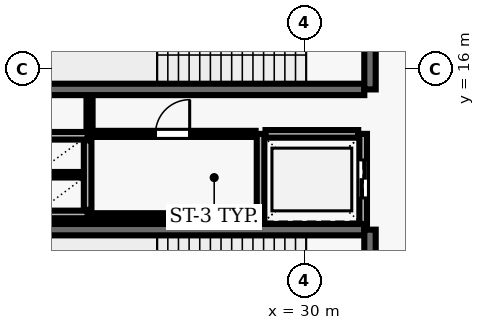
"""IFC4 building model, lengths in metres.
Left out: names, types, materials, properties, quantities, classifications, styles, units other than length and angle.
Written with IfcOpenShell. Run it as: python <this file> out.ifc"""

import sys

from ifc_helpers import new_model, si_unit, direction, frame, frame_2d, origin, place, context, subcontext, project, spatial, rectangle, extrude, element, fill, save


model = new_model("IFC4")
c1 = context("Model", 3, precision=1e-05, world=origin(), true_north=direction((0.0, 1.0)))
c2 = subcontext(c1, "Body", "Model", "MODEL_VIEW")
j1 = project(units=[si_unit("LENGTHUNIT", "METRE"), si_unit("PLANEANGLEUNIT", "RADIAN")], contexts=[c1])
p1 = place(None, origin())
s1 = spatial("IfcSite", under=j1, at=p1, CompositionType="ELEMENT")
p2 = place(p1, origin())
s2 = spatial("IfcBuilding", under=s1, at=p2, CompositionType="ELEMENT")
p3 = place(p2, frame((0.0, 0.0, 98.4)))
s3 = spatial("IfcBuildingStorey", under=s2, at=p3, CompositionType="ELEMENT", Elevation=98.4)
p4 = place(p3, frame((23.22, 15.47, 0.0), z_axis=(0.0, 0.0, 1.0), x_axis=(1.0, 0.0, 0.0)))
e1 = element("IfcWall", 1, at=p4, inside=s3, PredefinedType="SHEAR", context=c2, shape_type="SweptSolid", body=[
    extrude(rectangle(XDim=8.36, YDim=0.3, at=frame_2d((4.18, 0.0))), origin(), (0.0, 0.0, 1.0), 4.79),
])
p5 = place(p3, frame((31.73, 15.47, 0.0), z_axis=(0.0, 0.0, 1.0), x_axis=(0.0, 1.0, 0.0)))
e2 = element("IfcWall", 2, at=p5, inside=s3, PredefinedType="SHEAR", context=c2, shape_type="SweptSolid", body=[
    extrude(rectangle(XDim=3.51, YDim=0.3, at=frame_2d((1.755, 0.0))), origin(), (0.0, 0.0, 1.0), 4.79),
])
p6 = place(p5, frame((1.18, 0.0, 0.0)))
e3 = element("IfcOpeningElement", 3, at=p6, cuts=e2, PredefinedType="OPENING", context=c2, shape_type="SweptSolid", body=[
    extrude(rectangle(XDim=1.15, YDim=2.15, at=frame_2d((0.575, 1.075))), frame((0.0, 0.16, 0.0), z_axis=(0.0, -1.0, 0.0), x_axis=(1.0, 0.0, 0.0)), (0.0, 0.0, 1.0), 0.32),
])
p7 = place(p3, frame((31.58, 11.78, 0.0), z_axis=(0.0, 0.0, 1.0), x_axis=(-1.0, 0.0, 0.0)))
e4 = element("IfcWall", 4, at=p7, inside=s3, PredefinedType="SHEAR", context=c2, shape_type="SweptSolid", body=[
    extrude(rectangle(XDim=8.36, YDim=0.3, at=frame_2d((4.18, 0.0))), origin(), (0.0, 0.0, 1.0), 4.79),
])
p8 = place(p3, frame((31.73, 8.27, 0.0), z_axis=(0.0, 0.0, 1.0), x_axis=(0.0, 1.0, 0.0)))
e5 = element("IfcWall", 5, at=p8, inside=s3, PredefinedType="SHEAR", context=c2, shape_type="SweptSolid", body=[
    extrude(rectangle(XDim=3.51, YDim=0.3, at=frame_2d((1.755, 0.0))), origin(), (0.0, 0.0, 1.0), 4.79),
])
p9 = place(p8, frame((1.18, 0.0, 0.0)))
e6 = element("IfcOpeningElement", 6, at=p9, cuts=e5, PredefinedType="OPENING", context=c2, shape_type="SweptSolid", body=[
    extrude(rectangle(XDim=1.15, YDim=2.15, at=frame_2d((0.575, 1.075))), frame((0.0, 0.16, 0.0), z_axis=(0.0, -1.0, 0.0), x_axis=(1.0, 0.0, 0.0)), (0.0, 0.0, 1.0), 0.32),
])
p10 = place(p3, frame((28.85, 14.3, 0.0), z_axis=(0.0, 0.0, 1.0), x_axis=(0.0, -1.0, 0.0)))
e7 = element("IfcWall", 7, at=p10, inside=s3, PredefinedType="SOLIDWALL", context=c2, shape_type="SweptSolid", body=[
    extrude(rectangle(XDim=2.37, YDim=0.2, at=frame_2d((1.185, 0.0))), origin(), (0.0, 0.0, 1.0), 4.79),
])
p11 = place(p3, frame((31.55, 11.93, 0.0), z_axis=(0.0, 0.0, 1.0), x_axis=(0.0, 1.0, 0.0)))
e8 = element("IfcWall", 8, at=p11, inside=s3, PredefinedType="SOLIDWALL", context=c2, shape_type="SweptSolid", body=[
    extrude(rectangle(XDim=2.37, YDim=0.2, at=frame_2d((1.185, 0.0))), origin(), (0.0, 0.0, 1.0), 4.79),
])
p12 = place(p11, frame((0.685, 0.0, 0.0)))
e9 = element("IfcOpeningElement", 9, at=p12, cuts=e8, PredefinedType="OPENING", context=c2, shape_type="SweptSolid", body=[
    extrude(rectangle(XDim=1.0, YDim=2.1, at=frame_2d((0.5, 1.05))), frame((0.0, 0.11, 0.0), z_axis=(0.0, -1.0, 0.0), x_axis=(1.0, 0.0, 0.0)), (0.0, 0.0, 1.0), 0.22),
])
p13 = place(p3, frame((31.42, 14.3, 0.0), z_axis=(0.0, 0.0, 1.0), x_axis=(-1.0, 0.0, 0.0)))
e10 = element("IfcWall", 10, at=p13, inside=s3, PredefinedType="SOLIDWALL", context=c2, shape_type="SweptSolid", body=[
    extrude(rectangle(XDim=2.44, YDim=0.2, at=frame_2d((1.22, 0.0))), origin(), (0.0, 0.0, 1.0), 4.79),
])
for number, where, z_axis, x_axis in (
    (11, (22.9, 14.25, 0.0), (0.0, 0.0, 1.0), (1.0, 0.0, 0.0)),
    (12, (22.9, 12.18, 0.0), (0.0, 0.0, 1.0), (1.0, 0.0, 0.0)),
):
    element("IfcWall", number, at=place(p3, frame(where, z_axis=z_axis, x_axis=x_axis)), inside=s3, PredefinedType="SOLIDWALL", context=c2, shape_type="SweptSolid", body=[
        extrude(rectangle(XDim=1.4, YDim=0.2, at=frame_2d((0.7, 0.0))), origin(), (0.0, 0.0, 1.0), 4.79),
    ])
p14 = place(p3, frame((24.3, 12.3, 0.0), z_axis=(0.0, 0.0, 1.0), x_axis=(0.0, 1.0, 0.0)))
e13 = element("IfcWall", 13, at=p14, inside=s3, PredefinedType="SOLIDWALL", context=c2, shape_type="SweptSolid", body=[
    extrude(rectangle(XDim=1.83, YDim=0.2, at=frame_2d((0.915, 0.0))), origin(), (0.0, 0.0, 1.0), 4.79),
])
p15 = place(p3, frame((23.01, 13.225, 0.0), z_axis=(0.0, 0.0, 1.0), x_axis=(1.0, 0.0, 0.0)))
e14 = element("IfcWall", 14, at=p15, inside=s3, PredefinedType="PARTITIONING", context=c2, shape_type="SweptSolid", body=[
    extrude(rectangle(XDim=1.18, YDim=0.145, at=frame_2d((0.59, 0.0))), origin(), (0.0, 0.0, 1.0), 4.79),
])
p16 = place(p3, frame((24.35, 12.15, 0.0), z_axis=(0.0, 0.0, 1.0), x_axis=(1.0, 0.0, 0.0)))
e15 = element("IfcWall", 15, at=p16, inside=s3, PredefinedType="PARTITIONING", context=c2, shape_type="SweptSolid", body=[
    extrude(rectangle(XDim=4.37, YDim=0.125, at=frame_2d((2.185, 0.0))), origin(), (0.0, 0.0, 1.0), 4.79),
])
p17 = place(p3, frame((24.35, 14.3, 0.0), z_axis=(0.0, 0.0, 1.0), x_axis=(1.0, 0.0, 0.0)))
e16 = element("IfcWall", 16, at=p17, inside=s3, PredefinedType="PARTITIONING", context=c2, shape_type="SweptSolid", body=[
    extrude(rectangle(XDim=4.37, YDim=0.16, at=frame_2d((2.185, 0.0))), origin(), (0.0, 0.0, 1.0), 4.79),
])
p18 = place(p17, frame((1.735, 0.0, 0.0)))
e17 = element("IfcOpeningElement", 17, at=p18, cuts=e16, PredefinedType="OPENING", context=c2, shape_type="SweptSolid", body=[
    extrude(rectangle(XDim=0.9, YDim=2.1, at=frame_2d((0.45, 1.05))), frame((0.0, 0.09, 0.0), z_axis=(0.0, -1.0, 0.0), x_axis=(1.0, 0.0, 0.0)), (0.0, 0.0, 1.0), 0.18),
])
p19 = place(p3, frame((24.35, 15.29, 0.0), z_axis=(0.0, 0.0, 1.0), x_axis=(0.0, -1.0, 0.0)))
e18 = element("IfcWall", 18, at=p19, inside=s3, PredefinedType="PARTITIONING", context=c2, shape_type="SweptSolid", body=[
    extrude(rectangle(XDim=0.915, YDim=0.16, at=frame_2d((0.458, 0.0))), origin(), (0.0, 0.0, 1.0), 4.79),
])
p20 = place(p12, origin())
e19 = element("IfcDoor", 19, at=p20, inside=s3, OperationType="DOUBLE_DOOR_SLIDING", PredefinedType="DOOR", context=c2, shape_type="SweptSolid", body=[
    extrude(rectangle(XDim=1.0, YDim=2.1, at=frame_2d((0.5, 1.05))), frame((0.0, 0.025, 0.0), z_axis=(0.0, -1.0, 0.0), x_axis=(1.0, 0.0, 0.0)), (0.0, 0.0, 1.0), 0.05),
])
fill(e9, e19)
p21 = place(p18, origin())
e20 = element("IfcDoor", 20, at=p21, inside=s3, OperationType="SINGLE_SWING_RIGHT", PredefinedType="DOOR", context=c2, shape_type="SweptSolid", body=[
    extrude(rectangle(XDim=0.9, YDim=2.1, at=frame_2d((0.45, 1.05))), frame((0.0, 0.025, 0.0), z_axis=(0.0, -1.0, 0.0), x_axis=(1.0, 0.0, 0.0)), (0.0, 0.0, 1.0), 0.05),
])
fill(e17, e20)
save(model, sys.argv[1])
